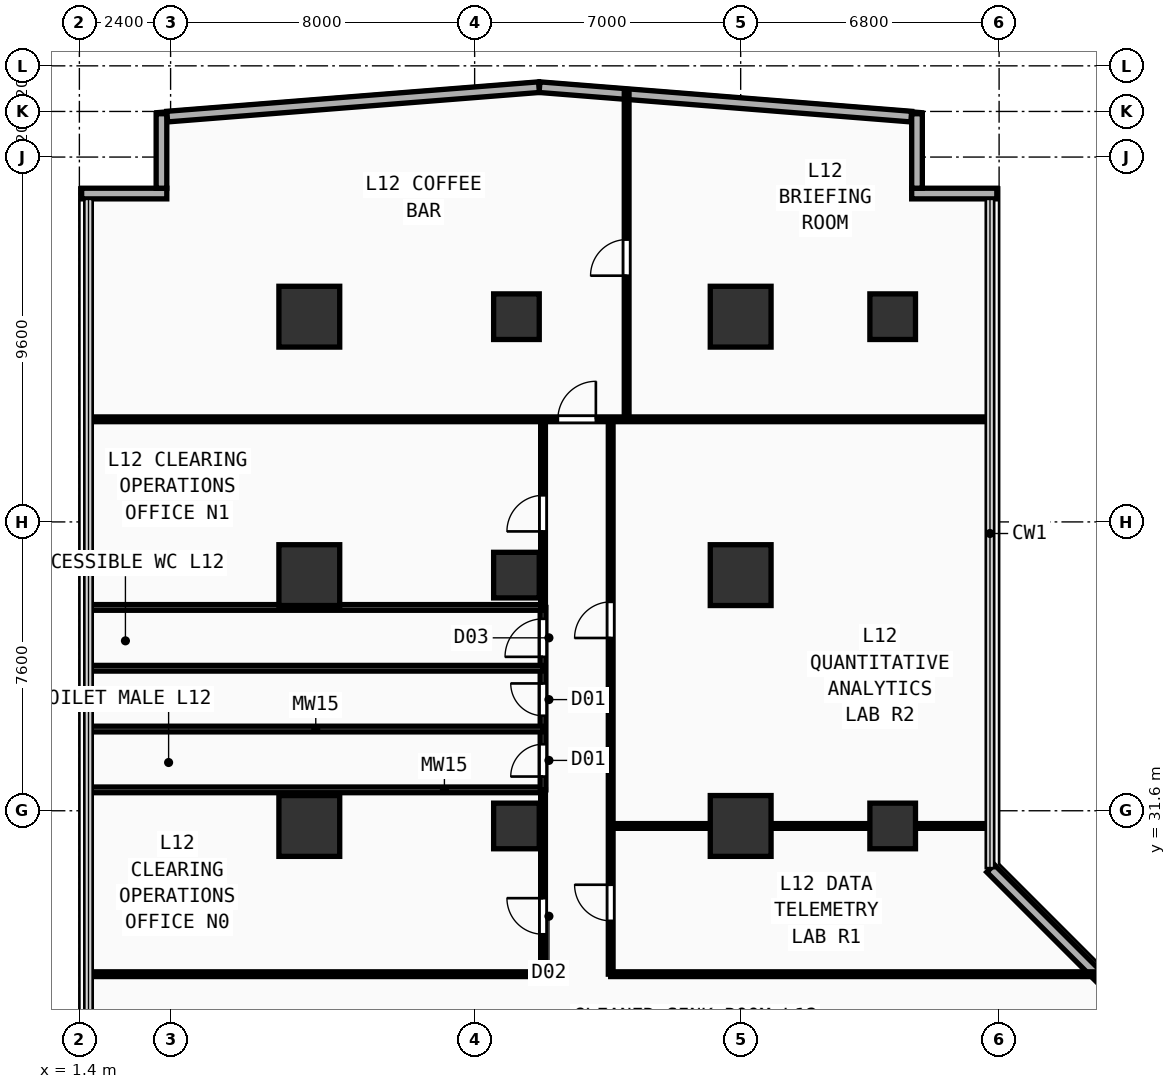
"""IFC4 building model, lengths in metres.
Left out: names, types, materials, properties, quantities, classifications, styles, units other than length and angle.
Written with IfcOpenShell. Run it as: python <this file> out.ifc"""

import sys

from ifc_helpers import new_model, si_unit, direction, frame, frame_2d, origin, origin_2d, place, context, subcontext, project, spatial, rectangle, extrude, element, fill, save


model = new_model("IFC4")
c1 = context("Model", 3, precision=1e-05, world=origin(), true_north=direction((0.0, 1.0)))
c2 = subcontext(c1, "Body", "Model", "MODEL_VIEW")
j1 = project(units=[si_unit("LENGTHUNIT", "METRE"), si_unit("PLANEANGLEUNIT", "RADIAN")], contexts=[c1])
p1 = place(None, origin())
s1 = spatial("IfcSite", under=j1, at=p1, CompositionType="ELEMENT")
p2 = place(p1, origin())
s2 = spatial("IfcBuilding", under=s1, at=p2, CompositionType="ELEMENT")
p3 = place(p2, frame((0.0, 0.0, 48.6)))
s3 = spatial("IfcBuildingStorey", under=s2, at=p3, CompositionType="ELEMENT", Elevation=48.6)
for number, where, z_axis, x_axis in (
    (1, (7.45, 31.2, 0.0), (0.0, 0.0, 1.0), (1.0, 0.0, 0.0)),
    (2, (7.45, 37.8, 0.0), (0.0, 0.0, 1.0), (1.0, 0.0, 0.0)),
    (3, (7.45, 44.6, 0.0), (0.0, 0.0, 1.0), (1.0, 0.0, 0.0)),
    (4, (18.8, 31.2, 0.0), (0.0, 0.0, 1.0), (1.0, 0.0, 0.0)),
    (5, (18.8, 37.8, 0.0), (0.0, 0.0, 1.0), (1.0, 0.0, 0.0)),
    (6, (18.8, 44.6, 0.0), (0.0, 0.0, 1.0), (1.0, 0.0, 0.0)),
):
    element("IfcColumn", number, at=place(p3, frame(where, z_axis=z_axis, x_axis=x_axis)), inside=s3, PredefinedType="COLUMN", context=c2, shape_type="SweptSolid", body=[
        extrude(rectangle(XDim=1.6, YDim=1.6, at=origin_2d()), origin(), (0.0, 0.0, 1.0), 3.54),
    ])
for number, where, z_axis, x_axis in (
    (7, (22.8, 31.2, 0.0), (0.0, 0.0, 1.0), (1.0, 0.0, 0.0)),
    (8, (22.8, 44.6, 0.0), (0.0, 0.0, 1.0), (1.0, 0.0, 0.0)),
    (9, (12.9, 31.2, 0.0), (0.0, 0.0, 1.0), (1.0, 0.0, 0.0)),
    (10, (12.9, 37.8, 0.0), (0.0, 0.0, 1.0), (1.0, 0.0, 0.0)),
    (11, (12.9, 44.6, 0.0), (0.0, 0.0, 1.0), (1.0, 0.0, 0.0)),
):
    element("IfcColumn", number, at=place(p3, frame(where, z_axis=z_axis, x_axis=x_axis)), inside=s3, PredefinedType="COLUMN", context=c2, shape_type="SweptSolid", body=[
        extrude(rectangle(XDim=1.2, YDim=1.2, at=origin_2d()), origin(), (0.0, 0.0, 1.0), 3.54),
    ])
p4 = place(p3, frame((23.3, 47.84, 0.0), z_axis=(0.0, 0.0, 1.0), x_axis=(1.0, 0.0, 0.0)))
e12 = element("IfcWall", 12, at=p4, inside=s3, PredefinedType="SOLIDWALL", context=c2, shape_type="SweptSolid", body=[
    extrude(rectangle(XDim=2.24, YDim=0.28, at=frame_2d((1.12, 0.0))), origin(), (0.0, 0.0, 1.0), 3.54),
])
p5 = place(p3, frame((23.44, 47.98, 0.0), z_axis=(0.0, 0.0, 1.0), x_axis=(0.0, 1.0, 0.0)))
e13 = element("IfcWall", 13, at=p5, inside=s3, PredefinedType="SOLIDWALL", context=c2, shape_type="SweptSolid", body=[
    extrude(rectangle(XDim=1.96, YDim=0.28, at=frame_2d((0.98, 0.0))), origin(), (0.0, 0.0, 1.0), 3.54),
])
p6 = place(p3, frame((1.46, 47.84, 0.0), z_axis=(0.0, 0.0, 1.0), x_axis=(1.0, 0.0, 0.0)))
e14 = element("IfcWall", 14, at=p6, inside=s3, PredefinedType="SOLIDWALL", context=c2, shape_type="SweptSolid", body=[
    extrude(rectangle(XDim=2.24, YDim=0.28, at=frame_2d((1.12, 0.0))), origin(), (0.0, 0.0, 1.0), 3.54),
])
p7 = place(p3, frame((3.56, 47.98, 0.0), z_axis=(0.0, 0.0, 1.0), x_axis=(0.0, 1.0, 0.0)))
e15 = element("IfcWall", 15, at=p7, inside=s3, PredefinedType="SOLIDWALL", context=c2, shape_type="SweptSolid", body=[
    extrude(rectangle(XDim=1.96, YDim=0.28, at=frame_2d((0.98, 0.0))), origin(), (0.0, 0.0, 1.0), 3.54),
])
p8 = place(p3, frame((31.885, 23.575, 0.0), z_axis=(0.0, 0.0, 1.0), x_axis=(-0.707106781187, 0.707106781187, 0.0)))
e16 = element("IfcWall", 16, at=p8, inside=s3, PredefinedType="SOLIDWALL", context=c2, shape_type="SweptSolid", body=[
    extrude(rectangle(XDim=9.207, YDim=0.28, at=frame_2d((4.603, 0.0))), origin(), (0.0, 0.0, 1.0), 3.54),
])
for number, where, z_axis, x_axis in (
    (17, (23.288, 49.864, 0.0), (0.0, 0.0, 1.0), (-0.997, 0.079, 0.0)),
    (18, (13.493, 50.639, 0.0), (0.0, 0.0, 1.0), (-0.997, -0.079, 0.0)),
):
    element("IfcWall", number, at=place(p3, frame(where, z_axis=z_axis, x_axis=x_axis)), inside=s3, PredefinedType="SOLIDWALL", context=c2, shape_type="SweptSolid", body=[
        extrude(rectangle(XDim=9.812, YDim=0.28, at=frame_2d((4.906, 0.0))), origin(), (0.0, 0.0, 1.0), 3.54),
    ])
p9 = place(p3, frame((13.6, 27.3, 0.0), z_axis=(0.0, 0.0, 1.0), x_axis=(0.0, 1.0, 0.0)))
e19 = element("IfcWall", 19, at=p9, inside=s3, PredefinedType="PARTITIONING", context=c2, shape_type="SweptSolid", body=[
    extrude(rectangle(XDim=4.85, YDim=0.125, at=frame_2d((2.425, 0.0))), origin(), (0.0, 0.0, 1.0), 3.54),
])
p10 = place(p9, frame((1.05, 0.0, 0.0)))
e20 = element("IfcOpeningElement", 20, at=p10, cuts=e19, PredefinedType="OPENING", context=c2, shape_type="SweptSolid", body=[
    extrude(rectangle(XDim=0.95, YDim=2.15, at=frame_2d((0.475, 1.075))), frame((0.0, 0.073, 0.0), z_axis=(0.0, -1.0, 0.0), x_axis=(1.0, 0.0, 0.0)), (0.0, 0.0, 1.0), 0.145),
])
p11 = place(p3, frame((1.64, 27.3, 0.0), z_axis=(0.0, 0.0, 1.0), x_axis=(1.0, 0.0, 0.0)))
e21 = element("IfcWall", 21, at=p11, inside=s3, PredefinedType="PARTITIONING", context=c2, shape_type="SweptSolid", body=[
    extrude(rectangle(XDim=11.96, YDim=0.125, at=frame_2d((5.98, 0.0))), origin(), (0.0, 0.0, 1.0), 3.54),
])
p12 = place(p3, frame((1.64, 32.15, 0.0), z_axis=(0.0, 0.0, 1.0), x_axis=(1.0, 0.0, 0.0)))
e22 = element("IfcWall", 22, at=p12, inside=s3, PredefinedType="PLUMBINGWALL", context=c2, shape_type="SweptSolid", body=[
    extrude(rectangle(XDim=11.96, YDim=0.15, at=frame_2d((5.98, 0.0))), origin(), (0.0, 0.0, 1.0), 3.54),
])
p13 = place(p3, frame((13.6, 32.15, 0.0), z_axis=(0.0, 0.0, 1.0), x_axis=(0.0, 1.0, 0.0)))
e23 = element("IfcWall", 23, at=p13, inside=s3, PredefinedType="PLUMBINGWALL", context=c2, shape_type="SweptSolid", body=[
    extrude(rectangle(XDim=4.8, YDim=0.15, at=frame_2d((2.4, 0.0))), origin(), (0.0, 0.0, 1.0), 3.54),
])
p14 = place(p13, frame((0.35, 0.0, 0.0)))
e24 = element("IfcOpeningElement", 24, at=p14, cuts=e23, PredefinedType="OPENING", context=c2, shape_type="SweptSolid", body=[
    extrude(rectangle(XDim=0.85, YDim=2.15, at=frame_2d((0.425, 1.075))), frame((0.0, 0.085, 0.0), z_axis=(0.0, -1.0, 0.0), x_axis=(1.0, 0.0, 0.0)), (0.0, 0.0, 1.0), 0.17),
])
p15 = place(p13, frame((1.95, 0.0, 0.0)))
e25 = element("IfcOpeningElement", 25, at=p15, cuts=e23, PredefinedType="OPENING", context=c2, shape_type="SweptSolid", body=[
    extrude(rectangle(XDim=0.85, YDim=2.15, at=frame_2d((0.425, 1.075))), frame((0.0, 0.085, 0.0), z_axis=(0.0, -1.0, 0.0), x_axis=(1.0, 0.0, 0.0)), (0.0, 0.0, 1.0), 0.17),
])
p16 = place(p13, frame((3.5, 0.0, 0.0)))
e26 = element("IfcOpeningElement", 26, at=p16, cuts=e23, PredefinedType="OPENING", context=c2, shape_type="SweptSolid", body=[
    extrude(rectangle(XDim=1.0, YDim=2.2, at=frame_2d((0.5, 1.1))), frame((0.0, 0.085, 0.0), z_axis=(0.0, -1.0, 0.0), x_axis=(1.0, 0.0, 0.0)), (0.0, 0.0, 1.0), 0.17),
])
for number, where, z_axis, x_axis in (
    (27, (1.64, 33.75, 0.0), (0.0, 0.0, 1.0), (1.0, 0.0, 0.0)),
    (28, (1.64, 35.35, 0.0), (0.0, 0.0, 1.0), (1.0, 0.0, 0.0)),
):
    element("IfcWall", number, at=place(p3, frame(where, z_axis=z_axis, x_axis=x_axis)), inside=s3, PredefinedType="PLUMBINGWALL", context=c2, shape_type="SweptSolid", body=[
        extrude(rectangle(XDim=11.96, YDim=0.15, at=frame_2d((5.98, 0.0))), origin(), (0.0, 0.0, 1.0), 3.04),
    ])
p17 = place(p3, frame((1.64, 36.95, 0.0), z_axis=(0.0, 0.0, 1.0), x_axis=(1.0, 0.0, 0.0)))
e29 = element("IfcWall", 29, at=p17, inside=s3, PredefinedType="PLUMBINGWALL", context=c2, shape_type="SweptSolid", body=[
    extrude(rectangle(XDim=11.96, YDim=0.15, at=frame_2d((5.98, 0.0))), origin(), (0.0, 0.0, 1.0), 3.54),
])
p18 = place(p3, frame((13.6, 36.95, 0.0), z_axis=(0.0, 0.0, 1.0), x_axis=(0.0, 1.0, 0.0)))
e30 = element("IfcWall", 30, at=p18, inside=s3, PredefinedType="PARTITIONING", context=c2, shape_type="SweptSolid", body=[
    extrude(rectangle(XDim=4.95, YDim=0.125, at=frame_2d((2.475, 0.0))), origin(), (0.0, 0.0, 1.0), 3.54),
])
p19 = place(p18, frame((2.0, 0.0, 0.0)))
e31 = element("IfcOpeningElement", 31, at=p19, cuts=e30, PredefinedType="OPENING", context=c2, shape_type="SweptSolid", body=[
    extrude(rectangle(XDim=0.95, YDim=2.15, at=frame_2d((0.475, 1.075))), frame((0.0, 0.073, 0.0), z_axis=(0.0, -1.0, 0.0), x_axis=(1.0, 0.0, 0.0)), (0.0, 0.0, 1.0), 0.145),
])
p20 = place(p3, frame((1.64, 41.9, 0.0), z_axis=(0.0, 0.0, 1.0), x_axis=(1.0, 0.0, 0.0)))
e32 = element("IfcWall", 32, at=p20, inside=s3, PredefinedType="PARTITIONING", context=c2, shape_type="SweptSolid", body=[
    extrude(rectangle(XDim=23.72, YDim=0.125, at=frame_2d((11.86, 0.0))), origin(), (0.0, 0.0, 1.0), 3.54),
])
p21 = place(p20, frame((12.35, 0.0, 0.0)))
e33 = element("IfcOpeningElement", 33, at=p21, cuts=e32, PredefinedType="OPENING", context=c2, shape_type="SweptSolid", body=[
    extrude(rectangle(XDim=1.0, YDim=2.2, at=frame_2d((0.5, 1.1))), frame((0.0, 0.073, 0.0), z_axis=(0.0, -1.0, 0.0), x_axis=(1.0, 0.0, 0.0)), (0.0, 0.0, 1.0), 0.145),
])
p22 = place(p3, frame((15.8, 41.9, 0.0), z_axis=(0.0, 0.0, 1.0), x_axis=(0.0, 1.0, 0.0)))
e34 = element("IfcWall", 34, at=p22, inside=s3, PredefinedType="PARTITIONING", context=c2, shape_type="SweptSolid", body=[
    extrude(rectangle(XDim=8.66, YDim=0.125, at=frame_2d((4.33, 0.0))), origin(), (0.0, 0.0, 1.0), 3.54),
])
p23 = place(p22, frame((3.779, 0.0, 0.0)))
e35 = element("IfcOpeningElement", 35, at=p23, cuts=e34, PredefinedType="OPENING", context=c2, shape_type="SweptSolid", body=[
    extrude(rectangle(XDim=0.95, YDim=2.15, at=frame_2d((0.475, 1.075))), frame((0.0, 0.073, 0.0), z_axis=(0.0, -1.0, 0.0), x_axis=(1.0, 0.0, 0.0)), (0.0, 0.0, 1.0), 0.145),
])
p24 = place(p3, frame((15.38, 27.3, 0.0), z_axis=(0.0, 0.0, 1.0), x_axis=(1.0, 0.0, 0.0)))
e36 = element("IfcWall", 36, at=p24, inside=s3, PredefinedType="PARTITIONING", context=c2, shape_type="SweptSolid", body=[
    extrude(rectangle(XDim=12.88, YDim=0.125, at=frame_2d((6.44, 0.0))), origin(), (0.0, 0.0, 1.0), 3.54),
])
p25 = place(p3, frame((15.38, 27.3, 0.0), z_axis=(0.0, 0.0, 1.0), x_axis=(0.0, 1.0, 0.0)))
e37 = element("IfcWall", 37, at=p25, inside=s3, PredefinedType="PARTITIONING", context=c2, shape_type="SweptSolid", body=[
    extrude(rectangle(XDim=14.6, YDim=0.125, at=frame_2d((7.3, 0.0))), origin(), (0.0, 0.0, 1.0), 3.54),
])
p26 = place(p25, frame((1.403, 0.0, 0.0)))
e38 = element("IfcOpeningElement", 38, at=p26, cuts=e37, PredefinedType="OPENING", context=c2, shape_type="SweptSolid", body=[
    extrude(rectangle(XDim=0.95, YDim=2.15, at=frame_2d((0.475, 1.075))), frame((0.0, 0.073, 0.0), z_axis=(0.0, -1.0, 0.0), x_axis=(1.0, 0.0, 0.0)), (0.0, 0.0, 1.0), 0.145),
])
p27 = place(p25, frame((8.846, 0.0, 0.0)))
e39 = element("IfcOpeningElement", 39, at=p27, cuts=e37, PredefinedType="OPENING", context=c2, shape_type="SweptSolid", body=[
    extrude(rectangle(XDim=0.95, YDim=2.15, at=frame_2d((0.475, 1.075))), frame((0.0, 0.073, 0.0), z_axis=(0.0, -1.0, 0.0), x_axis=(1.0, 0.0, 0.0)), (0.0, 0.0, 1.0), 0.145),
])
p28 = place(p3, frame((15.38, 31.2, 0.0), z_axis=(0.0, 0.0, 1.0), x_axis=(1.0, 0.0, 0.0)))
e40 = element("IfcWall", 40, at=p28, inside=s3, PredefinedType="PARTITIONING", context=c2, shape_type="SweptSolid", body=[
    extrude(rectangle(XDim=9.98, YDim=0.125, at=frame_2d((4.99, 0.0))), origin(), (0.0, 0.0, 1.0), 2.94),
])
p29 = place(p10, origin())
e41 = element("IfcDoor", 41, at=p29, inside=s3, OperationType="SINGLE_SWING_RIGHT", PredefinedType="DOOR", context=c2, shape_type="SweptSolid", body=[
    extrude(rectangle(XDim=0.95, YDim=2.15, at=frame_2d((0.475, 1.075))), frame((0.0, 0.025, 0.0), z_axis=(0.0, -1.0, 0.0), x_axis=(1.0, 0.0, 0.0)), (0.0, 0.0, 1.0), 0.05),
])
fill(e20, e41)
p30 = place(p14, origin())
e42 = element("IfcDoor", 42, at=p30, inside=s3, OperationType="SINGLE_SWING_LEFT", PredefinedType="DOOR", context=c2, shape_type="SweptSolid", body=[
    extrude(rectangle(XDim=0.85, YDim=2.15, at=frame_2d((0.425, 1.075))), frame((0.0, 0.025, 0.0), z_axis=(0.0, -1.0, 0.0), x_axis=(1.0, 0.0, 0.0)), (0.0, 0.0, 1.0), 0.05),
])
fill(e24, e42)
p31 = place(p15, origin())
e43 = element("IfcDoor", 43, at=p31, inside=s3, OperationType="SINGLE_SWING_RIGHT", PredefinedType="DOOR", context=c2, shape_type="SweptSolid", body=[
    extrude(rectangle(XDim=0.85, YDim=2.15, at=frame_2d((0.425, 1.075))), frame((0.0, 0.025, 0.0), z_axis=(0.0, -1.0, 0.0), x_axis=(1.0, 0.0, 0.0)), (0.0, 0.0, 1.0), 0.05),
])
fill(e25, e43)
p32 = place(p16, origin())
e44 = element("IfcDoor", 44, at=p32, inside=s3, OperationType="SINGLE_SWING_LEFT", PredefinedType="DOOR", context=c2, shape_type="SweptSolid", body=[
    extrude(rectangle(XDim=1.0, YDim=2.2, at=frame_2d((0.5, 1.1))), frame((0.0, 0.025, 0.0), z_axis=(0.0, -1.0, 0.0), x_axis=(1.0, 0.0, 0.0)), (0.0, 0.0, 1.0), 0.05),
])
fill(e26, e44)
p33 = place(p19, origin())
e45 = element("IfcDoor", 45, at=p33, inside=s3, OperationType="SINGLE_SWING_LEFT", PredefinedType="DOOR", context=c2, shape_type="SweptSolid", body=[
    extrude(rectangle(XDim=0.95, YDim=2.15, at=frame_2d((0.475, 1.075))), frame((0.0, 0.025, 0.0), z_axis=(0.0, -1.0, 0.0), x_axis=(1.0, 0.0, 0.0)), (0.0, 0.0, 1.0), 0.05),
])
fill(e31, e45)
p34 = place(p21, origin())
e46 = element("IfcDoor", 46, at=p34, inside=s3, OperationType="SINGLE_SWING_RIGHT", PredefinedType="DOOR", context=c2, shape_type="SweptSolid", body=[
    extrude(rectangle(XDim=1.0, YDim=2.2, at=frame_2d((0.5, 1.1))), frame((0.0, 0.025, 0.0), z_axis=(0.0, -1.0, 0.0), x_axis=(1.0, 0.0, 0.0)), (0.0, 0.0, 1.0), 0.05),
])
fill(e33, e46)
p35 = place(p23, origin())
e47 = element("IfcDoor", 47, at=p35, inside=s3, OperationType="SINGLE_SWING_LEFT", PredefinedType="DOOR", context=c2, shape_type="SweptSolid", body=[
    extrude(rectangle(XDim=0.95, YDim=2.15, at=frame_2d((0.475, 1.075))), frame((0.0, 0.025, 0.0), z_axis=(0.0, -1.0, 0.0), x_axis=(1.0, 0.0, 0.0)), (0.0, 0.0, 1.0), 0.05),
])
fill(e35, e47)
p36 = place(p26, origin())
e48 = element("IfcDoor", 48, at=p36, inside=s3, OperationType="SINGLE_SWING_RIGHT", PredefinedType="DOOR", context=c2, shape_type="SweptSolid", body=[
    extrude(rectangle(XDim=0.95, YDim=2.15, at=frame_2d((0.475, 1.075))), frame((0.0, 0.025, 0.0), z_axis=(0.0, -1.0, 0.0), x_axis=(1.0, 0.0, 0.0)), (0.0, 0.0, 1.0), 0.05),
])
fill(e38, e48)
p37 = place(p27, origin())
e49 = element("IfcDoor", 49, at=p37, inside=s3, OperationType="SINGLE_SWING_LEFT", PredefinedType="DOOR", context=c2, shape_type="SweptSolid", body=[
    extrude(rectangle(XDim=0.95, YDim=2.15, at=frame_2d((0.475, 1.075))), frame((0.0, 0.025, 0.0), z_axis=(0.0, -1.0, 0.0), x_axis=(1.0, 0.0, 0.0)), (0.0, 0.0, 1.0), 0.05),
])
fill(e39, e49)
save(model, sys.argv[1])
